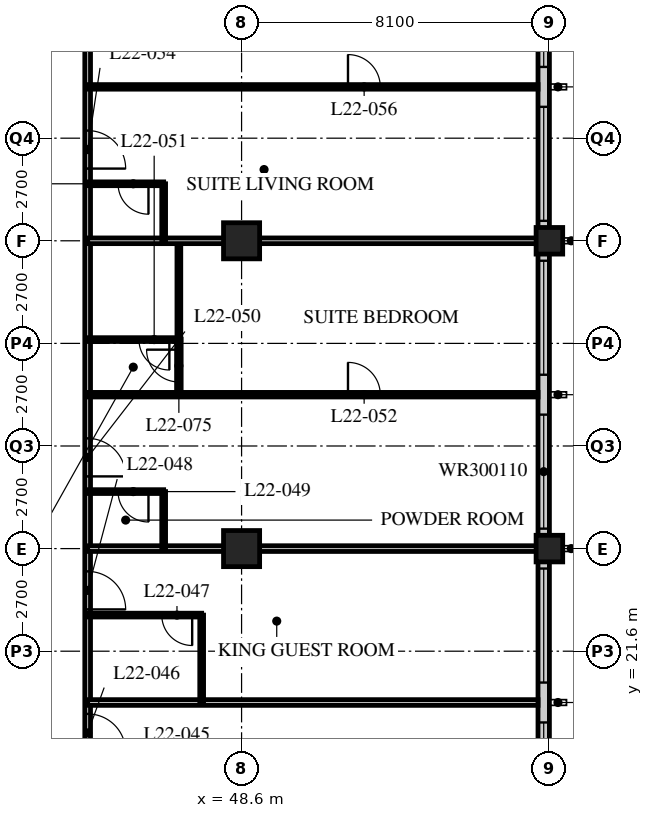
"""IFC4 building model, lengths in metres.
Left out: names, types, materials, properties, quantities, classifications, styles, units other than length and angle.
Written with IfcOpenShell. Run it as: python <this file> out.ifc"""

import sys

from ifc_helpers import new_model, si_unit, direction, frame, frame_2d, origin, origin_2d, place, context, subcontext, project, spatial, rectangle, hollow_rectangle, extrude, element, fill, save


model = new_model("IFC4")
c1 = context("Model", 3, precision=1e-05, world=origin(), true_north=direction((0.0, 1.0)))
c2 = subcontext(c1, "Body", "Model", "MODEL_VIEW")
j1 = project(units=[si_unit("LENGTHUNIT", "METRE"), si_unit("PLANEANGLEUNIT", "RADIAN")], contexts=[c1])
p1 = place(None, origin())
s1 = spatial("IfcSite", under=j1, at=p1, CompositionType="ELEMENT")
p2 = place(p1, origin())
s2 = spatial("IfcBuilding", under=s1, at=p2, CompositionType="ELEMENT")
p3 = place(p2, frame((0.0, 0.0, 87.4)))
s3 = spatial("IfcBuildingStorey", under=s2, at=p3, CompositionType="ELEMENT", Elevation=87.4)
for number, where, z_axis, x_axis in (
    (1, (48.6, 24.3, 0.0), (0.0, 0.0, 1.0), (1.0, 0.0, 0.0)),
    (2, (48.6, 32.4, 0.0), (0.0, 0.0, 1.0), (1.0, 0.0, 0.0)),
):
    element("IfcColumn", number, at=place(p3, frame(where, z_axis=z_axis, x_axis=x_axis)), inside=s3, PredefinedType="COLUMN", context=c2, shape_type="SweptSolid", body=[
        extrude(hollow_rectangle(XDim=0.95, YDim=0.95, WallThickness=0.095, at=origin_2d()), origin(), (0.0, 0.0, 1.0), 3.4),
    ])
for number, where, z_axis, x_axis in (
    (3, (56.7, 24.3, 0.0), (0.0, 0.0, 1.0), (1.0, 0.0, 0.0)),
    (4, (56.7, 32.4, 0.0), (0.0, 0.0, 1.0), (1.0, 0.0, 0.0)),
):
    element("IfcColumn", number, at=place(p3, frame(where, z_axis=z_axis, x_axis=x_axis)), inside=s3, PredefinedType="COLUMN", context=c2, shape_type="SweptSolid", body=[
        extrude(hollow_rectangle(XDim=0.7, YDim=0.7, WallThickness=0.06, at=origin_2d()), origin(), (0.0, 0.0, 1.0), 3.4),
    ])
p4 = place(p3, frame((56.55, 8.4, 0.0), z_axis=(0.0, 0.0, 1.0), x_axis=(0.0, 1.0, 0.0)))
e5 = element("IfcWall", 5, at=p4, inside=s3, PredefinedType="SOLIDWALL", context=c2, shape_type="SweptSolid", body=[
    extrude(rectangle(XDim=32.1, YDim=0.3, at=frame_2d((16.05, 0.0))), origin(), (0.0, 0.0, 1.0), 2.05),
])
p5 = place(p4, frame((0.225, 0.0, 0.9)))
e6 = element("IfcOpeningElement", 6, at=p5, cuts=e5, PredefinedType="OPENING", context=c2, shape_type="SweptSolid", body=[
    extrude(rectangle(XDim=3.0, YDim=1.1, at=frame_2d((1.5, 0.55))), frame((0.0, 0.16, 0.0), z_axis=(0.0, -1.0, 0.0), x_axis=(1.0, 0.0, 0.0)), (0.0, 0.0, 1.0), 0.32),
])
p6 = place(p4, frame((4.275, 0.0, 0.9)))
e7 = element("IfcOpeningElement", 7, at=p6, cuts=e5, PredefinedType="OPENING", context=c2, shape_type="SweptSolid", body=[
    extrude(rectangle(XDim=3.0, YDim=1.1, at=frame_2d((1.5, 0.55))), frame((0.0, 0.16, 0.0), z_axis=(0.0, -1.0, 0.0), x_axis=(1.0, 0.0, 0.0)), (0.0, 0.0, 1.0), 0.32),
])
p7 = place(p4, frame((8.325, 0.0, 0.9)))
e8 = element("IfcOpeningElement", 8, at=p7, cuts=e5, PredefinedType="OPENING", context=c2, shape_type="SweptSolid", body=[
    extrude(rectangle(XDim=3.0, YDim=1.1, at=frame_2d((1.5, 0.55))), frame((0.0, 0.16, 0.0), z_axis=(0.0, -1.0, 0.0), x_axis=(1.0, 0.0, 0.0)), (0.0, 0.0, 1.0), 0.32),
])
p8 = place(p4, frame((12.375, 0.0, 0.9)))
e9 = element("IfcOpeningElement", 9, at=p8, cuts=e5, PredefinedType="OPENING", context=c2, shape_type="SweptSolid", body=[
    extrude(rectangle(XDim=3.0, YDim=1.1, at=frame_2d((1.5, 0.55))), frame((0.0, 0.16, 0.0), z_axis=(0.0, -1.0, 0.0), x_axis=(1.0, 0.0, 0.0)), (0.0, 0.0, 1.0), 0.32),
])
p9 = place(p4, frame((16.425, 0.0, 0.9)))
e10 = element("IfcOpeningElement", 10, at=p9, cuts=e5, PredefinedType="OPENING", context=c2, shape_type="SweptSolid", body=[
    extrude(rectangle(XDim=3.0, YDim=1.1, at=frame_2d((1.5, 0.55))), frame((0.0, 0.16, 0.0), z_axis=(0.0, -1.0, 0.0), x_axis=(1.0, 0.0, 0.0)), (0.0, 0.0, 1.0), 0.32),
])
p10 = place(p4, frame((20.475, 0.0, 0.9)))
e11 = element("IfcOpeningElement", 11, at=p10, cuts=e5, PredefinedType="OPENING", context=c2, shape_type="SweptSolid", body=[
    extrude(rectangle(XDim=3.0, YDim=1.1, at=frame_2d((1.5, 0.55))), frame((0.0, 0.16, 0.0), z_axis=(0.0, -1.0, 0.0), x_axis=(1.0, 0.0, 0.0)), (0.0, 0.0, 1.0), 0.32),
])
p11 = place(p4, frame((24.525, 0.0, 0.9)))
e12 = element("IfcOpeningElement", 12, at=p11, cuts=e5, PredefinedType="OPENING", context=c2, shape_type="SweptSolid", body=[
    extrude(rectangle(XDim=3.0, YDim=1.1, at=frame_2d((1.5, 0.55))), frame((0.0, 0.16, 0.0), z_axis=(0.0, -1.0, 0.0), x_axis=(1.0, 0.0, 0.0)), (0.0, 0.0, 1.0), 0.32),
])
p12 = place(p4, frame((28.575, 0.0, 0.9)))
e13 = element("IfcOpeningElement", 13, at=p12, cuts=e5, PredefinedType="OPENING", context=c2, shape_type="SweptSolid", body=[
    extrude(rectangle(XDim=3.0, YDim=1.1, at=frame_2d((1.5, 0.55))), frame((0.0, 0.16, 0.0), z_axis=(0.0, -1.0, 0.0), x_axis=(1.0, 0.0, 0.0)), (0.0, 0.0, 1.0), 0.32),
])
p13 = place(p3, frame((44.55, 16.2, 0.0), z_axis=(0.0, 0.0, 1.0), x_axis=(0.0, 1.0, 0.0)))
e14 = element("IfcWall", 14, at=p13, inside=s3, PredefinedType="PARTITIONING", context=c2, shape_type="SweptSolid", body=[
    extrude(rectangle(XDim=26.1, YDim=0.15, at=frame_2d((13.05, 0.0))), origin(), (0.0, 0.0, 1.0), 3.15),
])
p14 = place(p13, frame((2.75, 0.0, 0.0)))
e15 = element("IfcOpeningElement", 15, at=p14, cuts=e14, PredefinedType="OPENING", context=c2, shape_type="SweptSolid", body=[
    extrude(rectangle(XDim=1.0, YDim=2.1, at=frame_2d((0.5, 1.05))), frame((0.0, 0.085, 0.0), z_axis=(0.0, -1.0, 0.0), x_axis=(1.0, 0.0, 0.0)), (0.0, 0.0, 1.0), 0.17),
])
p15 = place(p13, frame((6.5, 0.0, 0.0)))
e16 = element("IfcOpeningElement", 16, at=p15, cuts=e14, PredefinedType="OPENING", context=c2, shape_type="SweptSolid", body=[
    extrude(rectangle(XDim=1.0, YDim=2.1, at=frame_2d((0.5, 1.05))), frame((0.0, 0.085, 0.0), z_axis=(0.0, -1.0, 0.0), x_axis=(1.0, 0.0, 0.0)), (0.0, 0.0, 1.0), 0.17),
])
p16 = place(p13, frame((10.0, 0.0, 0.0)))
e17 = element("IfcOpeningElement", 17, at=p16, cuts=e14, PredefinedType="OPENING", context=c2, shape_type="SweptSolid", body=[
    extrude(rectangle(XDim=1.0, YDim=2.1, at=frame_2d((0.5, 1.05))), frame((0.0, 0.085, 0.0), z_axis=(0.0, -1.0, 0.0), x_axis=(1.0, 0.0, 0.0)), (0.0, 0.0, 1.0), 0.17),
])
p17 = place(p13, frame((18.1, 0.0, 0.0)))
e18 = element("IfcOpeningElement", 18, at=p17, cuts=e14, PredefinedType="OPENING", context=c2, shape_type="SweptSolid", body=[
    extrude(rectangle(XDim=1.0, YDim=2.1, at=frame_2d((0.5, 1.05))), frame((0.0, 0.085, 0.0), z_axis=(0.0, -1.0, 0.0), x_axis=(1.0, 0.0, 0.0)), (0.0, 0.0, 1.0), 0.17),
])
p18 = place(p3, frame((44.55, 20.25, 0.0), z_axis=(0.0, 0.0, 1.0), x_axis=(1.0, 0.0, 0.0)))
e19 = element("IfcWall", 19, at=p18, inside=s3, PredefinedType="PARTITIONING", context=c2, shape_type="SweptSolid", body=[
    extrude(rectangle(XDim=11.85, YDim=0.15, at=frame_2d((5.925, 0.0))), origin(), (0.0, 0.0, 1.0), 3.15),
])
p19 = place(p3, frame((47.55, 20.25, 0.0), z_axis=(0.0, 0.0, 1.0), x_axis=(0.0, 1.0, 0.0)))
e20 = element("IfcWall", 20, at=p19, inside=s3, PredefinedType="PARTITIONING", context=c2, shape_type="SweptSolid", body=[
    extrude(rectangle(XDim=2.3, YDim=0.1, at=frame_2d((1.15, 0.0))), origin(), (0.0, 0.0, 1.0), 3.15),
])
p20 = place(p3, frame((44.55, 22.55, 0.0), z_axis=(0.0, 0.0, 1.0), x_axis=(1.0, 0.0, 0.0)))
e21 = element("IfcWall", 21, at=p20, inside=s3, PredefinedType="PARTITIONING", context=c2, shape_type="SweptSolid", body=[
    extrude(rectangle(XDim=3.0, YDim=0.1, at=frame_2d((1.5, 0.0))), origin(), (0.0, 0.0, 1.0), 3.15),
])
p21 = place(p20, frame((1.95, 0.0, 0.0)))
e22 = element("IfcOpeningElement", 22, at=p21, cuts=e21, PredefinedType="OPENING", context=c2, shape_type="SweptSolid", body=[
    extrude(rectangle(XDim=0.8, YDim=2.1, at=frame_2d((0.4, 1.05))), frame((0.0, 0.06, 0.0), z_axis=(0.0, -1.0, 0.0), x_axis=(1.0, 0.0, 0.0)), (0.0, 0.0, 1.0), 0.12),
])
p22 = place(p3, frame((44.55, 24.3, 0.0), z_axis=(0.0, 0.0, 1.0), x_axis=(1.0, 0.0, 0.0)))
e23 = element("IfcWall", 23, at=p22, inside=s3, PredefinedType="PARTITIONING", context=c2, shape_type="SweptSolid", body=[
    extrude(rectangle(XDim=11.85, YDim=0.15, at=frame_2d((5.925, 0.0))), origin(), (0.0, 0.0, 1.0), 2.05),
])
p23 = place(p3, frame((46.55, 24.3, 0.0), z_axis=(0.0, 0.0, 1.0), x_axis=(0.0, 1.0, 0.0)))
e24 = element("IfcWall", 24, at=p23, inside=s3, PredefinedType="PARTITIONING", context=c2, shape_type="SweptSolid", body=[
    extrude(rectangle(XDim=1.5, YDim=0.1, at=frame_2d((0.75, 0.0))), origin(), (0.0, 0.0, 1.0), 3.15),
])
p24 = place(p3, frame((44.55, 25.8, 0.0), z_axis=(0.0, 0.0, 1.0), x_axis=(1.0, 0.0, 0.0)))
e25 = element("IfcWall", 25, at=p24, inside=s3, PredefinedType="PARTITIONING", context=c2, shape_type="SweptSolid", body=[
    extrude(rectangle(XDim=2.0, YDim=0.1, at=frame_2d((1.0, 0.0))), origin(), (0.0, 0.0, 1.0), 3.15),
])
p25 = place(p24, frame((0.8, 0.0, 0.0)))
e26 = element("IfcOpeningElement", 26, at=p25, cuts=e25, PredefinedType="OPENING", context=c2, shape_type="SweptSolid", body=[
    extrude(rectangle(XDim=0.8, YDim=2.1, at=frame_2d((0.4, 1.05))), frame((0.0, 0.06, 0.0), z_axis=(0.0, -1.0, 0.0), x_axis=(1.0, 0.0, 0.0)), (0.0, 0.0, 1.0), 0.12),
])
p26 = place(p3, frame((46.95, 29.8, 0.0), z_axis=(0.0, 0.0, 1.0), x_axis=(0.0, 1.0, 0.0)))
e27 = element("IfcWall", 27, at=p26, inside=s3, PredefinedType="PARTITIONING", context=c2, shape_type="SweptSolid", body=[
    extrude(rectangle(XDim=2.6, YDim=0.1, at=frame_2d((1.3, 0.0))), origin(), (0.0, 0.0, 1.0), 3.15),
])
p27 = place(p3, frame((44.55, 29.8, 0.0), z_axis=(0.0, 0.0, 1.0), x_axis=(1.0, 0.0, 0.0)))
e28 = element("IfcWall", 28, at=p27, inside=s3, PredefinedType="PARTITIONING", context=c2, shape_type="SweptSolid", body=[
    extrude(rectangle(XDim=2.4, YDim=0.1, at=frame_2d((1.2, 0.0))), origin(), (0.0, 0.0, 1.0), 3.15),
])
p28 = place(p27, frame((1.35, 0.0, 0.0)))
e29 = element("IfcOpeningElement", 29, at=p28, cuts=e28, PredefinedType="OPENING", context=c2, shape_type="SweptSolid", body=[
    extrude(rectangle(XDim=0.8, YDim=2.1, at=frame_2d((0.4, 1.05))), frame((0.0, 0.06, 0.0), z_axis=(0.0, -1.0, 0.0), x_axis=(1.0, 0.0, 0.0)), (0.0, 0.0, 1.0), 0.12),
])
p29 = place(p3, frame((44.55, 28.35, 0.0), z_axis=(0.0, 0.0, 1.0), x_axis=(1.0, 0.0, 0.0)))
e30 = element("IfcWall", 30, at=p29, inside=s3, PredefinedType="PARTITIONING", context=c2, shape_type="SweptSolid", body=[
    extrude(rectangle(XDim=11.85, YDim=0.12, at=frame_2d((5.925, 0.0))), origin(), (0.0, 0.0, 1.0), 3.15),
])
p30 = place(p29, frame((6.85, 0.0, 0.0)))
e31 = element("IfcOpeningElement", 31, at=p30, cuts=e30, PredefinedType="OPENING", context=c2, shape_type="SweptSolid", body=[
    extrude(rectangle(XDim=0.85, YDim=2.1, at=frame_2d((0.425, 1.05))), frame((0.0, 0.07, 0.0), z_axis=(0.0, -1.0, 0.0), x_axis=(1.0, 0.0, 0.0)), (0.0, 0.0, 1.0), 0.14),
])
p31 = place(p3, frame((44.55, 32.4, 0.0), z_axis=(0.0, 0.0, 1.0), x_axis=(1.0, 0.0, 0.0)))
e32 = element("IfcWall", 32, at=p31, inside=s3, PredefinedType="PARTITIONING", context=c2, shape_type="SweptSolid", body=[
    extrude(rectangle(XDim=11.85, YDim=0.15, at=frame_2d((5.925, 0.0))), origin(), (0.0, 0.0, 1.0), 2.388),
])
p32 = place(p3, frame((46.55, 32.4, 0.0), z_axis=(0.0, 0.0, 1.0), x_axis=(0.0, 1.0, 0.0)))
e33 = element("IfcWall", 33, at=p32, inside=s3, PredefinedType="PARTITIONING", context=c2, shape_type="SweptSolid", body=[
    extrude(rectangle(XDim=1.5, YDim=0.1, at=frame_2d((0.75, 0.0))), origin(), (0.0, 0.0, 1.0), 3.15),
])
p33 = place(p3, frame((44.55, 33.9, 0.0), z_axis=(0.0, 0.0, 1.0), x_axis=(1.0, 0.0, 0.0)))
e34 = element("IfcWall", 34, at=p33, inside=s3, PredefinedType="PARTITIONING", context=c2, shape_type="SweptSolid", body=[
    extrude(rectangle(XDim=2.0, YDim=0.1, at=frame_2d((1.0, 0.0))), origin(), (0.0, 0.0, 1.0), 3.15),
])
p34 = place(p33, frame((0.8, 0.0, 0.0)))
e35 = element("IfcOpeningElement", 35, at=p34, cuts=e34, PredefinedType="OPENING", context=c2, shape_type="SweptSolid", body=[
    extrude(rectangle(XDim=0.8, YDim=2.1, at=frame_2d((0.4, 1.05))), frame((0.0, 0.06, 0.0), z_axis=(0.0, -1.0, 0.0), x_axis=(1.0, 0.0, 0.0)), (0.0, 0.0, 1.0), 0.12),
])
p35 = place(p3, frame((44.55, 36.45, 0.0), z_axis=(0.0, 0.0, 1.0), x_axis=(1.0, 0.0, 0.0)))
e36 = element("IfcWall", 36, at=p35, inside=s3, PredefinedType="PARTITIONING", context=c2, shape_type="SweptSolid", body=[
    extrude(rectangle(XDim=11.85, YDim=0.12, at=frame_2d((5.925, 0.0))), origin(), (0.0, 0.0, 1.0), 3.15),
])
p36 = place(p35, frame((6.85, 0.0, 0.0)))
e37 = element("IfcOpeningElement", 37, at=p36, cuts=e36, PredefinedType="OPENING", context=c2, shape_type="SweptSolid", body=[
    extrude(rectangle(XDim=0.85, YDim=2.1, at=frame_2d((0.425, 1.05))), frame((0.0, 0.07, 0.0), z_axis=(0.0, -1.0, 0.0), x_axis=(1.0, 0.0, 0.0)), (0.0, 0.0, 1.0), 0.14),
])
p37 = place(p3, frame((46.95, 29.81, 0.0), z_axis=(0.0, 0.0, 1.0), x_axis=(0.0, -1.0, 0.0)))
e38 = element("IfcWall", 38, at=p37, inside=s3, PredefinedType="PARTITIONING", context=c2, shape_type="SweptSolid", body=[
    extrude(rectangle(XDim=1.46, YDim=0.12, at=frame_2d((0.73, 0.0))), origin(), (0.0, 0.0, 1.0), 3.15),
])
p38 = place(p37, frame((0.275, 0.0, 0.0)))
e39 = element("IfcOpeningElement", 39, at=p38, cuts=e38, PredefinedType="OPENING", context=c2, shape_type="SweptSolid", body=[
    extrude(rectangle(XDim=0.85, YDim=2.1, at=frame_2d((0.425, 1.05))), frame((0.0, 0.07, 0.0), z_axis=(0.0, -1.0, 0.0), x_axis=(1.0, 0.0, 0.0)), (0.0, 0.0, 1.0), 0.14),
])
p39 = place(p7, origin())
e40 = element("IfcWindow", 40, at=p39, inside=s3, PartitioningType="SINGLE_PANEL", PredefinedType="WINDOW", context=c2, shape_type="SweptSolid", body=[
    extrude(rectangle(XDim=3.0, YDim=1.1, at=frame_2d((1.5, 0.55))), frame((0.0, 0.03, 0.0), z_axis=(0.0, -1.0, 0.0), x_axis=(1.0, 0.0, 0.0)), (0.0, 0.0, 1.0), 0.06),
])
fill(e8, e40)
p40 = place(p8, origin())
e41 = element("IfcWindow", 41, at=p40, inside=s3, PartitioningType="SINGLE_PANEL", PredefinedType="WINDOW", context=c2, shape_type="SweptSolid", body=[
    extrude(rectangle(XDim=3.0, YDim=1.1, at=frame_2d((1.5, 0.55))), frame((0.0, 0.03, 0.0), z_axis=(0.0, -1.0, 0.0), x_axis=(1.0, 0.0, 0.0)), (0.0, 0.0, 1.0), 0.06),
])
fill(e9, e41)
p41 = place(p9, origin())
e42 = element("IfcWindow", 42, at=p41, inside=s3, PartitioningType="SINGLE_PANEL", PredefinedType="WINDOW", context=c2, shape_type="SweptSolid", body=[
    extrude(rectangle(XDim=3.0, YDim=1.1, at=frame_2d((1.5, 0.55))), frame((0.0, 0.03, 0.0), z_axis=(0.0, -1.0, 0.0), x_axis=(1.0, 0.0, 0.0)), (0.0, 0.0, 1.0), 0.06),
])
fill(e10, e42)
p42 = place(p10, origin())
e43 = element("IfcWindow", 43, at=p42, inside=s3, PartitioningType="SINGLE_PANEL", PredefinedType="WINDOW", context=c2, shape_type="SweptSolid", body=[
    extrude(rectangle(XDim=3.0, YDim=1.1, at=frame_2d((1.5, 0.55))), frame((0.0, 0.03, 0.0), z_axis=(0.0, -1.0, 0.0), x_axis=(1.0, 0.0, 0.0)), (0.0, 0.0, 1.0), 0.06),
])
fill(e11, e43)
p43 = place(p11, origin())
e44 = element("IfcWindow", 44, at=p43, inside=s3, PartitioningType="SINGLE_PANEL", PredefinedType="WINDOW", context=c2, shape_type="SweptSolid", body=[
    extrude(rectangle(XDim=3.0, YDim=1.1, at=frame_2d((1.5, 0.55))), frame((0.0, 0.03, 0.0), z_axis=(0.0, -1.0, 0.0), x_axis=(1.0, 0.0, 0.0)), (0.0, 0.0, 1.0), 0.06),
])
fill(e12, e44)
p44 = place(p12, origin())
e45 = element("IfcWindow", 45, at=p44, inside=s3, PartitioningType="SINGLE_PANEL", PredefinedType="WINDOW", context=c2, shape_type="SweptSolid", body=[
    extrude(rectangle(XDim=3.0, YDim=1.1, at=frame_2d((1.5, 0.55))), frame((0.0, 0.03, 0.0), z_axis=(0.0, -1.0, 0.0), x_axis=(1.0, 0.0, 0.0)), (0.0, 0.0, 1.0), 0.06),
])
fill(e13, e45)
p45 = place(p14, origin())
e46 = element("IfcDoor", 46, at=p45, inside=s3, OperationType="SINGLE_SWING_RIGHT", PredefinedType="DOOR", context=c2, shape_type="SweptSolid", body=[
    extrude(rectangle(XDim=1.0, YDim=2.1, at=frame_2d((0.5, 1.05))), frame((0.0, 0.025, 0.0), z_axis=(0.0, -1.0, 0.0), x_axis=(1.0, 0.0, 0.0)), (0.0, 0.0, 1.0), 0.05),
])
fill(e15, e46)
p46 = place(p21, origin())
e47 = element("IfcDoor", 47, at=p46, inside=s3, OperationType="SINGLE_SWING_LEFT", PredefinedType="DOOR", context=c2, shape_type="SweptSolid", body=[
    extrude(rectangle(XDim=0.8, YDim=2.1, at=frame_2d((0.4, 1.05))), frame((0.0, 0.025, 0.0), z_axis=(0.0, -1.0, 0.0), x_axis=(1.0, 0.0, 0.0)), (0.0, 0.0, 1.0), 0.05),
])
fill(e22, e47)
p47 = place(p15, origin())
e48 = element("IfcDoor", 48, at=p47, inside=s3, OperationType="SINGLE_SWING_RIGHT", PredefinedType="DOOR", context=c2, shape_type="SweptSolid", body=[
    extrude(rectangle(XDim=1.0, YDim=2.1, at=frame_2d((0.5, 1.05))), frame((0.0, 0.025, 0.0), z_axis=(0.0, -1.0, 0.0), x_axis=(1.0, 0.0, 0.0)), (0.0, 0.0, 1.0), 0.05),
])
fill(e16, e48)
p48 = place(p25, origin())
e49 = element("IfcDoor", 49, at=p48, inside=s3, OperationType="SINGLE_SWING_LEFT", PredefinedType="DOOR", context=c2, shape_type="SweptSolid", body=[
    extrude(rectangle(XDim=0.8, YDim=2.1, at=frame_2d((0.4, 1.05))), frame((0.0, 0.025, 0.0), z_axis=(0.0, -1.0, 0.0), x_axis=(1.0, 0.0, 0.0)), (0.0, 0.0, 1.0), 0.05),
])
fill(e26, e49)
p49 = place(p16, origin())
e50 = element("IfcDoor", 50, at=p49, inside=s3, OperationType="SINGLE_SWING_RIGHT", PredefinedType="DOOR", context=c2, shape_type="SweptSolid", body=[
    extrude(rectangle(XDim=1.0, YDim=2.1, at=frame_2d((0.5, 1.05))), frame((0.0, 0.025, 0.0), z_axis=(0.0, -1.0, 0.0), x_axis=(1.0, 0.0, 0.0)), (0.0, 0.0, 1.0), 0.05),
])
fill(e17, e50)
p50 = place(p28, origin())
e51 = element("IfcDoor", 51, at=p50, inside=s3, OperationType="SINGLE_SWING_LEFT", PredefinedType="DOOR", context=c2, shape_type="SweptSolid", body=[
    extrude(rectangle(XDim=0.8, YDim=2.1, at=frame_2d((0.4, 1.05))), frame((0.0, 0.025, 0.0), z_axis=(0.0, -1.0, 0.0), x_axis=(1.0, 0.0, 0.0)), (0.0, 0.0, 1.0), 0.05),
])
fill(e29, e51)
p51 = place(p30, origin())
e52 = element("IfcDoor", 52, at=p51, inside=s3, OperationType="SINGLE_SWING_LEFT", PredefinedType="DOOR", context=c2, shape_type="SweptSolid", body=[
    extrude(rectangle(XDim=0.85, YDim=2.1, at=frame_2d((0.425, 1.05))), frame((0.0, 0.025, 0.0), z_axis=(0.0, -1.0, 0.0), x_axis=(1.0, 0.0, 0.0)), (0.0, 0.0, 1.0), 0.05),
])
fill(e31, e52)
p52 = place(p34, origin())
e53 = element("IfcDoor", 53, at=p52, inside=s3, OperationType="SINGLE_SWING_LEFT", PredefinedType="DOOR", context=c2, shape_type="SweptSolid", body=[
    extrude(rectangle(XDim=0.8, YDim=2.1, at=frame_2d((0.4, 1.05))), frame((0.0, 0.025, 0.0), z_axis=(0.0, -1.0, 0.0), x_axis=(1.0, 0.0, 0.0)), (0.0, 0.0, 1.0), 0.05),
])
fill(e35, e53)
p53 = place(p17, origin())
e54 = element("IfcDoor", 54, at=p53, inside=s3, OperationType="SINGLE_SWING_RIGHT", PredefinedType="DOOR", context=c2, shape_type="SweptSolid", body=[
    extrude(rectangle(XDim=1.0, YDim=2.1, at=frame_2d((0.5, 1.05))), frame((0.0, 0.025, 0.0), z_axis=(0.0, -1.0, 0.0), x_axis=(1.0, 0.0, 0.0)), (0.0, 0.0, 1.0), 0.05),
])
fill(e18, e54)
p54 = place(p36, origin())
e55 = element("IfcDoor", 55, at=p54, inside=s3, OperationType="SINGLE_SWING_LEFT", PredefinedType="DOOR", context=c2, shape_type="SweptSolid", body=[
    extrude(rectangle(XDim=0.85, YDim=2.1, at=frame_2d((0.425, 1.05))), frame((0.0, 0.025, 0.0), z_axis=(0.0, -1.0, 0.0), x_axis=(1.0, 0.0, 0.0)), (0.0, 0.0, 1.0), 0.05),
])
fill(e37, e55)
p55 = place(p38, origin())
e56 = element("IfcDoor", 56, at=p55, inside=s3, OperationType="SINGLE_SWING_RIGHT", PredefinedType="DOOR", context=c2, shape_type="SweptSolid", body=[
    extrude(rectangle(XDim=0.85, YDim=2.1, at=frame_2d((0.425, 1.05))), frame((0.0, 0.025, 0.0), z_axis=(0.0, -1.0, 0.0), x_axis=(1.0, 0.0, 0.0)), (0.0, 0.0, 1.0), 0.05),
])
fill(e39, e56)
save(model, sys.argv[1])
